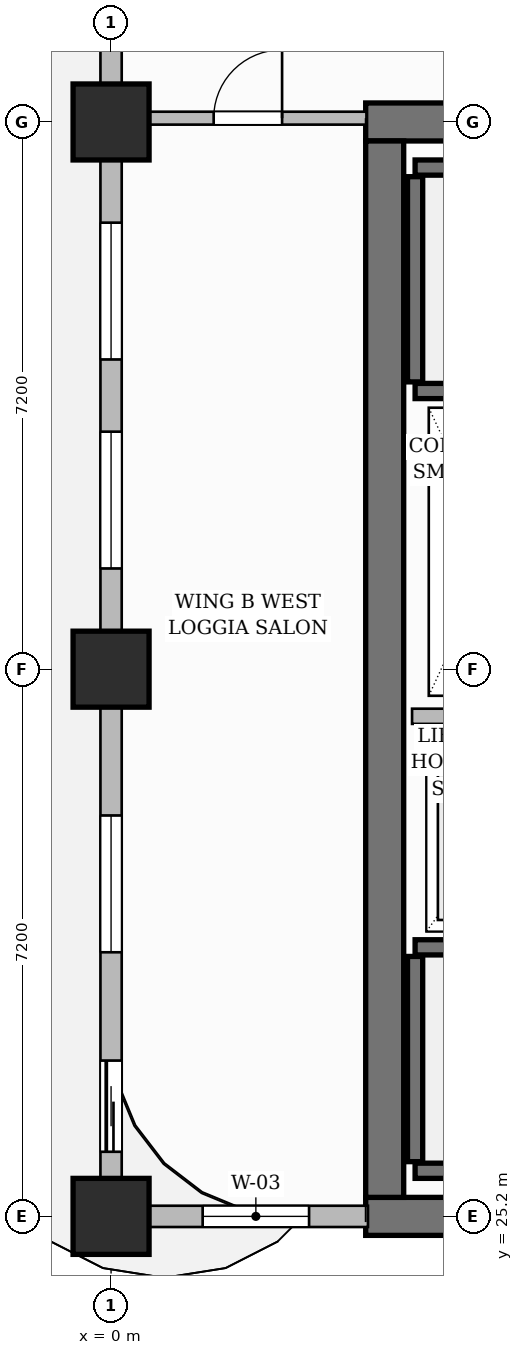
"""IFC4 building model, lengths in metres.
Left out: names, types, materials, properties, quantities, classifications, styles, units other than length and angle.
Written with IfcOpenShell. Run it as: python <this file> out.ifc"""

import sys

from ifc_helpers import new_model, si_unit, direction, frame, frame_2d, origin, origin_2d, place, context, subcontext, project, spatial, rectangle, extrude, source, transform, mapped, element, fill, save


model = new_model("IFC4")
c1 = context("Model", 3, precision=1e-05, world=origin(), true_north=direction((0.0, 1.0)))
c2 = subcontext(c1, "Body", "Model", "MODEL_VIEW")
j1 = project(units=[si_unit("LENGTHUNIT", "METRE"), si_unit("PLANEANGLEUNIT", "RADIAN")], contexts=[c1])
p1 = place(None, origin())
s1 = spatial("IfcSite", under=j1, at=p1, CompositionType="ELEMENT")
p2 = place(p1, origin())
s2 = spatial("IfcBuilding", under=s1, at=p2, CompositionType="ELEMENT")
p3 = place(p2, frame((0.0, 0.0, 150.3)))
s3 = spatial("IfcBuildingStorey", under=s2, at=p3, CompositionType="ELEMENT", Elevation=150.3)
for number, where, z_axis, x_axis in (
    (1, (3.35, 25.2, 0.0), (0.0, 0.0, 1.0), (1.0, 0.0, 0.0)),
    (2, (3.35, 39.6, 0.0), (0.0, 0.0, 1.0), (1.0, 0.0, 0.0)),
):
    element("IfcWall", number, at=place(p3, frame(where, z_axis=z_axis, x_axis=x_axis)), inside=s3, PredefinedType="SHEAR", context=c2, shape_type="SweptSolid", body=[
        extrude(rectangle(XDim=8.3, YDim=0.5, at=frame_2d((4.15, 0.0))), origin(), (0.0, 0.0, 1.0), 3.85),
    ])
p4 = place(p3, frame((3.6, 25.45, 0.0), z_axis=(0.0, 0.0, 1.0), x_axis=(0.0, 1.0, 0.0)))
e3 = element("IfcWall", 3, at=p4, inside=s3, PredefinedType="SHEAR", context=c2, shape_type="SweptSolid", body=[
    extrude(rectangle(XDim=13.9, YDim=0.5, at=frame_2d((6.95, 0.0))), origin(), (0.0, 0.0, 1.0), 3.85),
])
m1 = source(origin(), c2, "Body", "SweptSolid", [
    extrude(rectangle(XDim=1.0, YDim=1.0, at=origin_2d()), origin(), (0.0, 0.0, 1.0), 3.85),
])
for number, where, z_axis, x_axis in (
    (4, (0.0, 25.2, 0.0), (0.0, 0.0, 1.0), (1.0, 0.0, 0.0)),
    (5, (0.0, 32.4, 0.0), (0.0, 0.0, 1.0), (1.0, 0.0, 0.0)),
    (6, (0.0, 39.6, 0.0), (0.0, 0.0, 1.0), (1.0, 0.0, 0.0)),
):
    element("IfcColumn", number, at=place(p3, frame(where, z_axis=z_axis, x_axis=x_axis)), inside=s3, PredefinedType="COLUMN", context=c2, shape_type="MappedRepresentation", body=[
        mapped(m1, transform((0.0, 0.0, 0.0), scale=1.0)),
    ])
p5 = place(p3, frame((4.0, 25.8, 0.0), z_axis=(0.0, 0.0, 1.0), x_axis=(1.0, 0.0, 0.0)))
e7 = element("IfcWall", 7, at=p5, inside=s3, PredefinedType="SHEAR", context=c2, shape_type="SweptSolid", body=[
    extrude(rectangle(XDim=7.1, YDim=0.2, at=frame_2d((3.55, 0.0))), origin(), (0.0, 0.0, 1.0), 3.85),
])
p6 = place(p3, frame((4.0, 25.92, 0.0), z_axis=(0.0, 0.0, 1.0), x_axis=(0.0, 1.0, 0.0)))
e8 = element("IfcWall", 8, at=p6, inside=s3, PredefinedType="SHEAR", context=c2, shape_type="SweptSolid", body=[
    extrude(rectangle(XDim=2.7, YDim=0.2, at=frame_2d((1.35, 0.0))), origin(), (0.0, 0.0, 1.0), 3.85),
])
p7 = place(p3, frame((4.0, 28.74, 0.0), z_axis=(0.0, 0.0, 1.0), x_axis=(1.0, 0.0, 0.0)))
e9 = element("IfcWall", 9, at=p7, inside=s3, PredefinedType="SHEAR", context=c2, shape_type="SweptSolid", body=[
    extrude(rectangle(XDim=7.1, YDim=0.2, at=frame_2d((3.55, 0.0))), origin(), (0.0, 0.0, 1.0), 3.85),
])
p8 = place(p7, frame((5.815, 0.0, 0.0)))
e10 = element("IfcOpeningElement", 10, at=p8, cuts=e9, PredefinedType="OPENING", context=c2, shape_type="SweptSolid", body=[
    extrude(rectangle(XDim=1.05, YDim=2.2, at=frame_2d((0.525, 1.1))), frame((0.0, 0.11, 0.0), z_axis=(0.0, -1.0, 0.0), x_axis=(1.0, 0.0, 0.0)), (0.0, 0.0, 1.0), 0.22),
])
p9 = place(p3, frame((4.0, 39.0, 0.0), z_axis=(0.0, 0.0, 1.0), x_axis=(1.0, 0.0, 0.0)))
e11 = element("IfcWall", 11, at=p9, inside=s3, PredefinedType="SHEAR", context=c2, shape_type="SweptSolid", body=[
    extrude(rectangle(XDim=7.1, YDim=0.2, at=frame_2d((3.55, 0.0))), origin(), (0.0, 0.0, 1.0), 3.85),
])
p10 = place(p3, frame((4.0, 36.18, 0.0), z_axis=(0.0, 0.0, 1.0), x_axis=(0.0, 1.0, 0.0)))
e12 = element("IfcWall", 12, at=p10, inside=s3, PredefinedType="SHEAR", context=c2, shape_type="SweptSolid", body=[
    extrude(rectangle(XDim=2.7, YDim=0.2, at=frame_2d((1.35, 0.0))), origin(), (0.0, 0.0, 1.0), 3.85),
])
p11 = place(p3, frame((4.0, 36.06, 0.0), z_axis=(0.0, 0.0, 1.0), x_axis=(1.0, 0.0, 0.0)))
e13 = element("IfcWall", 13, at=p11, inside=s3, PredefinedType="SHEAR", context=c2, shape_type="SweptSolid", body=[
    extrude(rectangle(XDim=7.1, YDim=0.2, at=frame_2d((3.55, 0.0))), origin(), (0.0, 0.0, 1.0), 3.85),
])
p12 = place(p11, frame((5.815, 0.0, 0.0)))
e14 = element("IfcOpeningElement", 14, at=p12, cuts=e13, PredefinedType="OPENING", context=c2, shape_type="SweptSolid", body=[
    extrude(rectangle(XDim=1.05, YDim=2.2, at=frame_2d((0.525, 1.1))), frame((0.0, 0.11, 0.0), z_axis=(0.0, -1.0, 0.0), x_axis=(1.0, 0.0, 0.0)), (0.0, 0.0, 1.0), 0.22),
])
p13 = place(p3, frame((3.96, 31.78, 0.0), z_axis=(0.0, 0.0, 1.0), x_axis=(1.0, 0.0, 0.0)))
e15 = element("IfcWall", 15, at=p13, inside=s3, PredefinedType="PARTITIONING", context=c2, shape_type="SweptSolid", body=[
    extrude(rectangle(XDim=2.13, YDim=0.2, at=frame_2d((1.065, 0.0))), origin(), (0.0, 0.0, 1.0), 3.6),
])
p14 = place(p3, frame((0.24, 39.65, 0.0), z_axis=(0.0, 0.0, 1.0), x_axis=(1.0, 0.0, 0.0)))
e16 = element("IfcWall", 16, at=p14, inside=s3, PredefinedType="PARTITIONING", context=c2, shape_type="SweptSolid", body=[
    extrude(rectangle(XDim=3.12, YDim=0.17, at=frame_2d((1.56, 0.0))), origin(), (0.0, 0.0, 1.0), 3.6),
])
p15 = place(p14, frame((1.11, 0.0, 0.0)))
e17 = element("IfcOpeningElement", 17, at=p15, cuts=e16, PredefinedType="OPENING", context=c2, shape_type="SweptSolid", body=[
    extrude(rectangle(XDim=0.9, YDim=2.15, at=frame_2d((0.45, 1.075))), frame((0.0, 0.095, 0.0), z_axis=(0.0, -1.0, 0.0), x_axis=(1.0, 0.0, 0.0)), (0.0, 0.0, 1.0), 0.19),
])
p16 = place(p3, frame((0.0, 25.2, 0.0), z_axis=(0.0, 0.0, 1.0), x_axis=(1.0, 0.0, 0.0)))
e18 = element("IfcWall", 18, at=p16, inside=s3, PredefinedType="SOLIDWALL", context=c2, shape_type="SweptSolid", body=[
    extrude(rectangle(XDim=3.38, YDim=0.28, at=frame_2d((1.69, 0.0))), origin(), (0.0, 0.0, 1.0), 3.6),
])
p17 = place(p16, frame((1.205, 0.0, 0.8)))
e19 = element("IfcOpeningElement", 19, at=p17, cuts=e18, PredefinedType="OPENING", context=c2, shape_type="SweptSolid", body=[
    extrude(rectangle(XDim=1.4, YDim=1.85, at=frame_2d((0.7, 0.925))), frame((0.0, 0.15, 0.0), z_axis=(0.0, -1.0, 0.0), x_axis=(1.0, 0.0, 0.0)), (0.0, 0.0, 1.0), 0.3),
])
p18 = place(p3, frame((0.0, 25.25, 0.0), z_axis=(0.0, 0.0, 1.0), x_axis=(0.0, 1.0, 0.0)))
e20 = element("IfcWall", 20, at=p18, inside=s3, PredefinedType="SOLIDWALL", context=c2, shape_type="SweptSolid", body=[
    extrude(rectangle(XDim=21.5, YDim=0.28, at=frame_2d((10.75, 0.0))), origin(), (0.0, 0.0, 1.0), 3.085),
])
p19 = place(p18, frame((18.45, 0.0, 0.0)))
e21 = element("IfcOpeningElement", 21, at=p19, cuts=e20, PredefinedType="OPENING", context=c2, shape_type="SweptSolid", body=[
    extrude(rectangle(XDim=1.2, YDim=2.2, at=frame_2d((0.6, 1.1))), frame((0.0, 0.15, 0.0), z_axis=(0.0, -1.0, 0.0), x_axis=(1.0, 0.0, 0.0)), (0.0, 0.0, 1.0), 0.3),
])
p20 = place(p18, frame((0.8, 0.0, 0.0)))
e22 = element("IfcOpeningElement", 22, at=p20, cuts=e20, PredefinedType="OPENING", context=c2, shape_type="SweptSolid", body=[
    extrude(rectangle(XDim=1.2, YDim=2.2, at=frame_2d((0.6, 1.1))), frame((0.0, 0.15, 0.0), z_axis=(0.0, -1.0, 0.0), x_axis=(1.0, 0.0, 0.0)), (0.0, 0.0, 1.0), 0.3),
])
p21 = place(p18, frame((3.425, 0.0, 0.8)))
e23 = element("IfcOpeningElement", 23, at=p21, cuts=e20, PredefinedType="OPENING", context=c2, shape_type="SweptSolid", body=[
    extrude(rectangle(XDim=1.8, YDim=1.85, at=frame_2d((0.9, 0.925))), frame((0.0, 0.15, 0.0), z_axis=(0.0, -1.0, 0.0), x_axis=(1.0, 0.0, 0.0)), (0.0, 0.0, 1.0), 0.3),
])
p22 = place(p18, frame((8.475, 0.0, 0.8)))
e24 = element("IfcOpeningElement", 24, at=p22, cuts=e20, PredefinedType="OPENING", context=c2, shape_type="SweptSolid", body=[
    extrude(rectangle(XDim=1.8, YDim=1.85, at=frame_2d((0.9, 0.925))), frame((0.0, 0.15, 0.0), z_axis=(0.0, -1.0, 0.0), x_axis=(1.0, 0.0, 0.0)), (0.0, 0.0, 1.0), 0.3),
])
p23 = place(p18, frame((11.225, 0.0, 0.8)))
e25 = element("IfcOpeningElement", 25, at=p23, cuts=e20, PredefinedType="OPENING", context=c2, shape_type="SweptSolid", body=[
    extrude(rectangle(XDim=1.8, YDim=1.85, at=frame_2d((0.9, 0.925))), frame((0.0, 0.15, 0.0), z_axis=(0.0, -1.0, 0.0), x_axis=(1.0, 0.0, 0.0)), (0.0, 0.0, 1.0), 0.3),
])
p24 = place(p18, frame((15.75, 0.0, 0.8)))
e26 = element("IfcOpeningElement", 26, at=p24, cuts=e20, PredefinedType="OPENING", context=c2, shape_type="SweptSolid", body=[
    extrude(rectangle(XDim=1.8, YDim=1.85, at=frame_2d((0.9, 0.925))), frame((0.0, 0.15, 0.0), z_axis=(0.0, -1.0, 0.0), x_axis=(1.0, 0.0, 0.0)), (0.0, 0.0, 1.0), 0.3),
])
m2 = source(origin(), c2, "Body", "SweptSolid", [
    extrude(rectangle(XDim=0.9, YDim=2.15, at=frame_2d((0.45, 1.075))), frame((0.0, 0.025, 0.0), z_axis=(0.0, -1.0, 0.0), x_axis=(1.0, 0.0, 0.0)), (0.0, 0.0, 1.0), 0.05),
])
p25 = place(p15, origin())
e27 = element("IfcDoor", 27, at=p25, inside=s3, OperationType="SINGLE_SWING_RIGHT", PredefinedType="DOOR", context=c2, shape_type="MappedRepresentation", body=[
    mapped(m2, transform((0.0, 0.0, 0.0), scale=1.0)),
])
fill(e17, e27)
m3 = source(origin(), c2, "Body", "SweptSolid", [
    extrude(rectangle(XDim=1.2, YDim=2.2, at=frame_2d((0.6, 1.1))), frame((0.0, 0.025, 0.0), z_axis=(0.0, -1.0, 0.0), x_axis=(1.0, 0.0, 0.0)), (0.0, 0.0, 1.0), 0.05),
])
p26 = place(p20, origin())
e28 = element("IfcDoor", 28, at=p26, inside=s3, OperationType="SLIDING_TO_LEFT", PredefinedType="DOOR", context=c2, shape_type="MappedRepresentation", body=[
    mapped(m3, transform((0.0, 0.0, 0.0), scale=1.0)),
])
fill(e22, e28)
m4 = source(origin(), c2, "Body", "SweptSolid", [
    extrude(rectangle(XDim=1.4, YDim=1.85, at=frame_2d((0.7, 0.925))), frame((0.0, 0.03, 0.0), z_axis=(0.0, -1.0, 0.0), x_axis=(1.0, 0.0, 0.0)), (0.0, 0.0, 1.0), 0.06),
])
p27 = place(p17, origin())
e29 = element("IfcWindow", 29, at=p27, inside=s3, PartitioningType="SINGLE_PANEL", PredefinedType="WINDOW", context=c2, shape_type="MappedRepresentation", body=[
    mapped(m4, transform((0.0, 0.0, 0.0), scale=1.0)),
])
fill(e19, e29)
m5 = source(origin(), c2, "Body", "SweptSolid", [
    extrude(rectangle(XDim=1.8, YDim=1.85, at=frame_2d((0.9, 0.925))), frame((0.0, 0.03, 0.0), z_axis=(0.0, -1.0, 0.0), x_axis=(1.0, 0.0, 0.0)), (0.0, 0.0, 1.0), 0.06),
])
p28 = place(p21, origin())
e30 = element("IfcWindow", 30, at=p28, inside=s3, PartitioningType="DOUBLE_PANEL_VERTICAL", PredefinedType="WINDOW", context=c2, shape_type="MappedRepresentation", body=[
    mapped(m5, transform((0.0, 0.0, 0.0), scale=1.0)),
])
fill(e23, e30)
p29 = place(p22, origin())
e31 = element("IfcWindow", 31, at=p29, inside=s3, PartitioningType="DOUBLE_PANEL_VERTICAL", PredefinedType="WINDOW", context=c2, shape_type="MappedRepresentation", body=[
    mapped(m5, transform((0.0, 0.0, 0.0), scale=1.0)),
])
fill(e24, e31)
p30 = place(p23, origin())
e32 = element("IfcWindow", 32, at=p30, inside=s3, PartitioningType="DOUBLE_PANEL_VERTICAL", PredefinedType="WINDOW", context=c2, shape_type="MappedRepresentation", body=[
    mapped(m5, transform((0.0, 0.0, 0.0), scale=1.0)),
])
fill(e25, e32)
save(model, sys.argv[1])
